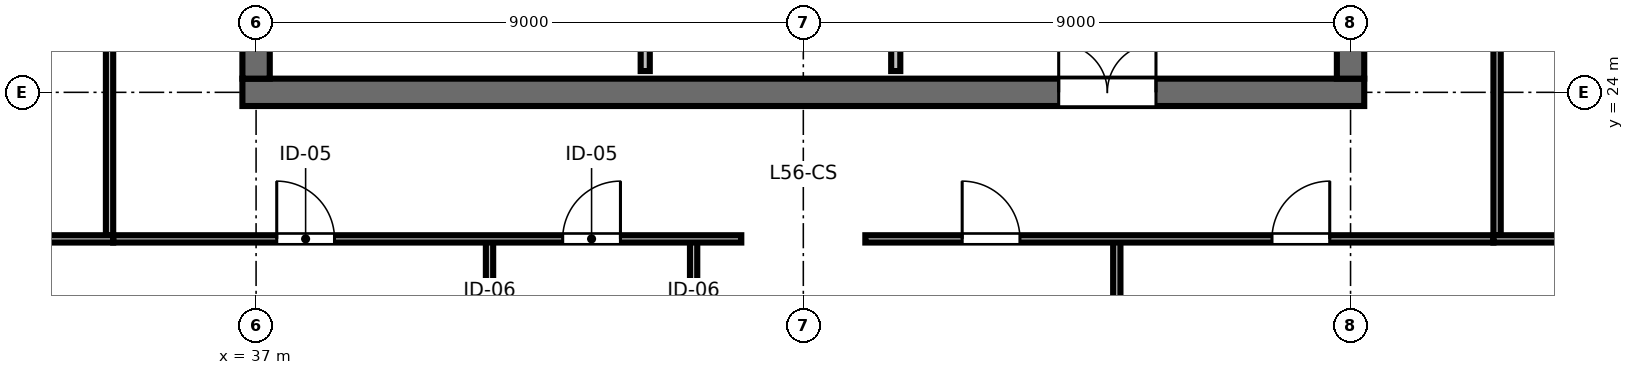
"""IFC4 building model, lengths in metres.
Left out: names, types, materials, properties, quantities, classifications, styles, units other than length and angle.
Written with IfcOpenShell. Run it as: python <this file> out.ifc"""

import sys

from ifc_helpers import new_model, si_unit, direction, frame, frame_2d, origin, place, context, subcontext, project, spatial, rectangle, extrude, element, fill, save


model = new_model("IFC4")
c1 = context("Model", 3, precision=1e-05, world=origin(), true_north=direction((0.0, 1.0)))
c2 = subcontext(c1, "Body", "Model", "MODEL_VIEW")
j1 = project(units=[si_unit("LENGTHUNIT", "METRE"), si_unit("PLANEANGLEUNIT", "RADIAN")], contexts=[c1])
p1 = place(None, origin())
s1 = spatial("IfcSite", under=j1, at=p1, CompositionType="ELEMENT")
p2 = place(p1, origin())
s2 = spatial("IfcBuilding", under=s1, at=p2, CompositionType="ELEMENT")
p3 = place(p2, frame((0.0, 0.0, 213.0)))
s3 = spatial("IfcBuildingStorey", under=s2, at=p3, CompositionType="ELEMENT", Elevation=213.0)
p4 = place(p3, frame((36.775, 24.0, 0.0), z_axis=(0.0, 0.0, 1.0), x_axis=(1.0, 0.0, 0.0)))
e1 = element("IfcWall", 1, at=p4, inside=s3, PredefinedType="SHEAR", context=c2, shape_type="SweptSolid", body=[
    extrude(rectangle(XDim=18.45, YDim=0.45, at=frame_2d((9.225, 0.0))), origin(), (0.0, 0.0, 1.0), 3.36),
])
p5 = place(p4, frame((13.425, 0.0, 0.0)))
e2 = element("IfcOpeningElement", 2, at=p5, cuts=e1, PredefinedType="OPENING", context=c2, shape_type="SweptSolid", body=[
    extrude(rectangle(XDim=1.6, YDim=2.15, at=frame_2d((0.8, 1.075))), frame((0.0, 0.235, 0.0), z_axis=(0.0, -1.0, 0.0), x_axis=(1.0, 0.0, 0.0)), (0.0, 0.0, 1.0), 0.47),
])
p6 = place(p3, frame((37.0, 24.225, 0.0), z_axis=(0.0, 0.0, 1.0), x_axis=(0.0, 1.0, 0.0)))
e3 = element("IfcWall", 3, at=p6, inside=s3, PredefinedType="SHEAR", context=c2, shape_type="SweptSolid", body=[
    extrude(rectangle(XDim=15.55, YDim=0.45, at=frame_2d((7.775, 0.0))), origin(), (0.0, 0.0, 1.0), 3.36),
])
p7 = place(p6, frame((5.3, 0.0, 0.0)))
e4 = element("IfcOpeningElement", 4, at=p7, cuts=e3, PredefinedType="OPENING", context=c2, shape_type="SweptSolid", body=[
    extrude(rectangle(XDim=1.15, YDim=2.15, at=frame_2d((0.575, 1.075))), frame((0.0, 0.235, 0.0), z_axis=(0.0, -1.0, 0.0), x_axis=(1.0, 0.0, 0.0)), (0.0, 0.0, 1.0), 0.47),
])
p8 = place(p3, frame((55.0, 24.225, 0.0), z_axis=(0.0, 0.0, 1.0), x_axis=(0.0, 1.0, 0.0)))
e5 = element("IfcWall", 5, at=p8, inside=s3, PredefinedType="SHEAR", context=c2, shape_type="SweptSolid", body=[
    extrude(rectangle(XDim=15.55, YDim=0.45, at=frame_2d((7.775, 0.0))), origin(), (0.0, 0.0, 1.0), 3.36),
])
p9 = place(p8, frame((5.3, 0.0, 0.0)))
e6 = element("IfcOpeningElement", 6, at=p9, cuts=e5, PredefinedType="OPENING", context=c2, shape_type="SweptSolid", body=[
    extrude(rectangle(XDim=1.15, YDim=2.15, at=frame_2d((0.575, 1.075))), frame((0.0, 0.235, 0.0), z_axis=(0.0, -1.0, 0.0), x_axis=(1.0, 0.0, 0.0)), (0.0, 0.0, 1.0), 0.47),
])
p10 = place(p3, frame((43.4, 24.35, 0.0), z_axis=(0.0, 0.0, 1.0), x_axis=(0.0, 1.0, 0.0)))
e7 = element("IfcWall", 7, at=p10, inside=s3, PredefinedType="PARTITIONING", context=c2, shape_type="SweptSolid", body=[
    extrude(rectangle(XDim=3.9, YDim=0.15, at=frame_2d((1.95, 0.0))), origin(), (0.0, 0.0, 1.0), 3.375),
])
p11 = place(p10, frame((1.5, 0.0, 0.0)))
e8 = element("IfcOpeningElement", 8, at=p11, cuts=e7, PredefinedType="OPENING", context=c2, shape_type="SweptSolid", body=[
    extrude(rectangle(XDim=0.9, YDim=2.15, at=frame_2d((0.45, 1.075))), frame((0.0, 0.085, 0.0), z_axis=(0.0, -1.0, 0.0), x_axis=(1.0, 0.0, 0.0)), (0.0, 0.0, 1.0), 0.17),
])
p12 = place(p3, frame((47.52, 24.35, 0.0), z_axis=(0.0, 0.0, 1.0), x_axis=(0.0, 1.0, 0.0)))
e9 = element("IfcWall", 9, at=p12, inside=s3, PredefinedType="PARTITIONING", context=c2, shape_type="SweptSolid", body=[
    extrude(rectangle(XDim=3.9, YDim=0.15, at=frame_2d((1.95, 0.0))), origin(), (0.0, 0.0, 1.0), 3.375),
])
p13 = place(p12, frame((0.35, 0.0, 0.0)))
e10 = element("IfcOpeningElement", 10, at=p13, cuts=e9, PredefinedType="OPENING", context=c2, shape_type="SweptSolid", body=[
    extrude(rectangle(XDim=0.9, YDim=2.15, at=frame_2d((0.45, 1.075))), frame((0.0, 0.085, 0.0), z_axis=(0.0, -1.0, 0.0), x_axis=(1.0, 0.0, 0.0)), (0.0, 0.0, 1.0), 0.17),
])
p14 = place(p3, frame((40.839, 21.59, 0.0), z_axis=(0.0, 0.0, 1.0), x_axis=(0.0, -1.0, 0.0)))
e11 = element("IfcWall", 11, at=p14, inside=s3, PredefinedType="PARTITIONING", context=c2, shape_type="SweptSolid", body=[
    extrude(rectangle(XDim=7.574, YDim=0.12, at=frame_2d((3.787, 0.0))), origin(), (0.0, 0.0, 1.0), 2.655),
])
p15 = place(p14, frame((1.4, 0.0, 0.0)))
e12 = element("IfcOpeningElement", 12, at=p15, cuts=e11, PredefinedType="OPENING", context=c2, shape_type="SweptSolid", body=[
    extrude(rectangle(XDim=0.9, YDim=2.15, at=frame_2d((0.45, 1.075))), frame((0.0, 0.07, 0.0), z_axis=(0.0, -1.0, 0.0), x_axis=(1.0, 0.0, 0.0)), (0.0, 0.0, 1.0), 0.14),
])
p16 = place(p3, frame((44.196, 21.59, 0.0), z_axis=(0.0, 0.0, 1.0), x_axis=(0.0, -1.0, 0.0)))
e13 = element("IfcWall", 13, at=p16, inside=s3, PredefinedType="PARTITIONING", context=c2, shape_type="SweptSolid", body=[
    extrude(rectangle(XDim=7.574, YDim=0.12, at=frame_2d((3.787, 0.0))), origin(), (0.0, 0.0, 1.0), 2.655),
])
p17 = place(p16, frame((1.4, 0.0, 0.0)))
e14 = element("IfcOpeningElement", 14, at=p17, cuts=e13, PredefinedType="OPENING", context=c2, shape_type="SweptSolid", body=[
    extrude(rectangle(XDim=0.9, YDim=2.15, at=frame_2d((0.45, 1.075))), frame((0.0, 0.07, 0.0), z_axis=(0.0, -1.0, 0.0), x_axis=(1.0, 0.0, 0.0)), (0.0, 0.0, 1.0), 0.14),
])
p18 = place(p3, frame((51.156, 21.59, 0.0), z_axis=(0.0, 0.0, 1.0), x_axis=(0.0, -1.0, 0.0)))
e15 = element("IfcWall", 15, at=p18, inside=s3, PredefinedType="PARTITIONING", context=c2, shape_type="SweptSolid", body=[
    extrude(rectangle(XDim=7.574, YDim=0.12, at=frame_2d((3.787, 0.0))), origin(), (0.0, 0.0, 1.0), 2.655),
])
p19 = place(p18, frame((1.4, 0.0, 0.0)))
e16 = element("IfcOpeningElement", 16, at=p19, cuts=e15, PredefinedType="OPENING", context=c2, shape_type="SweptSolid", body=[
    extrude(rectangle(XDim=0.9, YDim=2.15, at=frame_2d((0.45, 1.075))), frame((0.0, 0.07, 0.0), z_axis=(0.0, -1.0, 0.0), x_axis=(1.0, 0.0, 0.0)), (0.0, 0.0, 1.0), 0.14),
])
p20 = place(p3, frame((34.65, 21.59, 0.0), z_axis=(0.0, 0.0, 1.0), x_axis=(1.0, 0.0, 0.0)))
e17 = element("IfcWall", 17, at=p20, inside=s3, PredefinedType="PARTITIONING", context=c2, shape_type="SweptSolid", body=[
    extrude(rectangle(XDim=10.33, YDim=0.12, at=frame_2d((5.165, 0.0))), origin(), (0.0, 0.0, 1.0), 2.655),
])
p21 = place(p20, frame((2.69, 0.0, 0.0)))
e18 = element("IfcOpeningElement", 18, at=p21, cuts=e17, PredefinedType="OPENING", context=c2, shape_type="SweptSolid", body=[
    extrude(rectangle(XDim=0.95, YDim=2.15, at=frame_2d((0.475, 1.075))), frame((0.0, 0.07, 0.0), z_axis=(0.0, -1.0, 0.0), x_axis=(1.0, 0.0, 0.0)), (0.0, 0.0, 1.0), 0.14),
])
p22 = place(p20, frame((7.393, 0.0, 0.0)))
e19 = element("IfcOpeningElement", 19, at=p22, cuts=e17, PredefinedType="OPENING", context=c2, shape_type="SweptSolid", body=[
    extrude(rectangle(XDim=0.95, YDim=2.15, at=frame_2d((0.475, 1.075))), frame((0.0, 0.07, 0.0), z_axis=(0.0, -1.0, 0.0), x_axis=(1.0, 0.0, 0.0)), (0.0, 0.0, 1.0), 0.14),
])
p23 = place(p3, frame((47.02, 21.59, 0.0), z_axis=(0.0, 0.0, 1.0), x_axis=(1.0, 0.0, 0.0)))
e20 = element("IfcWall", 20, at=p23, inside=s3, PredefinedType="PARTITIONING", context=c2, shape_type="SweptSolid", body=[
    extrude(rectangle(XDim=10.33, YDim=0.12, at=frame_2d((5.165, 0.0))), origin(), (0.0, 0.0, 1.0), 2.655),
])
p24 = place(p23, frame((1.593, 0.0, 0.0)))
e21 = element("IfcOpeningElement", 21, at=p24, cuts=e20, PredefinedType="OPENING", context=c2, shape_type="SweptSolid", body=[
    extrude(rectangle(XDim=0.95, YDim=2.15, at=frame_2d((0.475, 1.075))), frame((0.0, 0.07, 0.0), z_axis=(0.0, -1.0, 0.0), x_axis=(1.0, 0.0, 0.0)), (0.0, 0.0, 1.0), 0.14),
])
p25 = place(p23, frame((6.688, 0.0, 0.0)))
e22 = element("IfcOpeningElement", 22, at=p25, cuts=e20, PredefinedType="OPENING", context=c2, shape_type="SweptSolid", body=[
    extrude(rectangle(XDim=0.95, YDim=2.15, at=frame_2d((0.475, 1.075))), frame((0.0, 0.07, 0.0), z_axis=(0.0, -1.0, 0.0), x_axis=(1.0, 0.0, 0.0)), (0.0, 0.0, 1.0), 0.14),
])
p26 = place(p3, frame((34.59, 21.65, 0.0), z_axis=(0.0, 0.0, 1.0), x_axis=(0.0, 1.0, 0.0)))
e23 = element("IfcWall", 23, at=p26, inside=s3, PredefinedType="PARTITIONING", context=c2, shape_type="SweptSolid", body=[
    extrude(rectangle(XDim=20.7, YDim=0.12, at=frame_2d((10.35, 0.0))), origin(), (0.0, 0.0, 1.0), 2.655),
])
p27 = place(p26, frame((9.875, 0.0, 0.0)))
e24 = element("IfcOpeningElement", 24, at=p27, cuts=e23, PredefinedType="OPENING", context=c2, shape_type="SweptSolid", body=[
    extrude(rectangle(XDim=0.95, YDim=2.15, at=frame_2d((0.475, 1.075))), frame((0.0, 0.07, 0.0), z_axis=(0.0, -1.0, 0.0), x_axis=(1.0, 0.0, 0.0)), (0.0, 0.0, 1.0), 0.14),
])
p28 = place(p3, frame((57.41, 21.65, 0.0), z_axis=(0.0, 0.0, 1.0), x_axis=(0.0, 1.0, 0.0)))
e25 = element("IfcWall", 25, at=p28, inside=s3, PredefinedType="PARTITIONING", context=c2, shape_type="SweptSolid", body=[
    extrude(rectangle(XDim=20.7, YDim=0.12, at=frame_2d((10.35, 0.0))), origin(), (0.0, 0.0, 1.0), 2.655),
])
p29 = place(p28, frame((3.546, 0.0, 0.0)))
e26 = element("IfcOpeningElement", 26, at=p29, cuts=e25, PredefinedType="OPENING", context=c2, shape_type="SweptSolid", body=[
    extrude(rectangle(XDim=0.95, YDim=2.15, at=frame_2d((0.475, 1.075))), frame((0.0, 0.07, 0.0), z_axis=(0.0, -1.0, 0.0), x_axis=(1.0, 0.0, 0.0)), (0.0, 0.0, 1.0), 0.14),
])
p30 = place(p28, frame((10.054, 0.0, 0.0)))
e27 = element("IfcOpeningElement", 27, at=p30, cuts=e25, PredefinedType="OPENING", context=c2, shape_type="SweptSolid", body=[
    extrude(rectangle(XDim=0.95, YDim=2.15, at=frame_2d((0.475, 1.075))), frame((0.0, 0.07, 0.0), z_axis=(0.0, -1.0, 0.0), x_axis=(1.0, 0.0, 0.0)), (0.0, 0.0, 1.0), 0.14),
])
p31 = place(p28, frame((16.384, 0.0, 0.0)))
e28 = element("IfcOpeningElement", 28, at=p31, cuts=e25, PredefinedType="OPENING", context=c2, shape_type="SweptSolid", body=[
    extrude(rectangle(XDim=0.95, YDim=2.15, at=frame_2d((0.475, 1.075))), frame((0.0, 0.07, 0.0), z_axis=(0.0, -1.0, 0.0), x_axis=(1.0, 0.0, 0.0)), (0.0, 0.0, 1.0), 0.14),
])
for number, where, z_axis, x_axis in (
    (29, (34.65, 21.59, 0.0), (0.0, 0.0, 1.0), (-1.0, 0.0, 0.0)),
    (30, (57.35, 21.59, 0.0), (0.0, 0.0, 1.0), (1.0, 0.0, 0.0)),
):
    element("IfcWall", number, at=place(p3, frame(where, z_axis=z_axis, x_axis=x_axis)), inside=s3, PredefinedType="PARTITIONING", context=c2, shape_type="SweptSolid", body=[
        extrude(rectangle(XDim=8.856, YDim=0.12, at=frame_2d((4.428, 0.0))), origin(), (0.0, 0.0, 1.0), 2.655),
    ])
p32 = place(p5, origin())
e31 = element("IfcDoor", 31, at=p32, inside=s3, OperationType="DOUBLE_DOOR_SINGLE_SWING", PredefinedType="DOOR", context=c2, shape_type="SweptSolid", body=[
    extrude(rectangle(XDim=1.6, YDim=2.15, at=frame_2d((0.8, 1.075))), frame((0.0, 0.025, 0.0), z_axis=(0.0, -1.0, 0.0), x_axis=(1.0, 0.0, 0.0)), (0.0, 0.0, 1.0), 0.05),
])
fill(e2, e31)
p33 = place(p21, origin())
e32 = element("IfcDoor", 32, at=p33, inside=s3, OperationType="SINGLE_SWING_LEFT", PredefinedType="DOOR", context=c2, shape_type="SweptSolid", body=[
    extrude(rectangle(XDim=0.95, YDim=2.15, at=frame_2d((0.475, 1.075))), frame((0.0, 0.025, 0.0), z_axis=(0.0, -1.0, 0.0), x_axis=(1.0, 0.0, 0.0)), (0.0, 0.0, 1.0), 0.05),
])
fill(e18, e32)
p34 = place(p22, origin())
e33 = element("IfcDoor", 33, at=p34, inside=s3, OperationType="SINGLE_SWING_RIGHT", PredefinedType="DOOR", context=c2, shape_type="SweptSolid", body=[
    extrude(rectangle(XDim=0.95, YDim=2.15, at=frame_2d((0.475, 1.075))), frame((0.0, 0.025, 0.0), z_axis=(0.0, -1.0, 0.0), x_axis=(1.0, 0.0, 0.0)), (0.0, 0.0, 1.0), 0.05),
])
fill(e19, e33)
p35 = place(p24, origin())
e34 = element("IfcDoor", 34, at=p35, inside=s3, OperationType="SINGLE_SWING_LEFT", PredefinedType="DOOR", context=c2, shape_type="SweptSolid", body=[
    extrude(rectangle(XDim=0.95, YDim=2.15, at=frame_2d((0.475, 1.075))), frame((0.0, 0.025, 0.0), z_axis=(0.0, -1.0, 0.0), x_axis=(1.0, 0.0, 0.0)), (0.0, 0.0, 1.0), 0.05),
])
fill(e21, e34)
p36 = place(p25, origin())
e35 = element("IfcDoor", 35, at=p36, inside=s3, OperationType="SINGLE_SWING_RIGHT", PredefinedType="DOOR", context=c2, shape_type="SweptSolid", body=[
    extrude(rectangle(XDim=0.95, YDim=2.15, at=frame_2d((0.475, 1.075))), frame((0.0, 0.025, 0.0), z_axis=(0.0, -1.0, 0.0), x_axis=(1.0, 0.0, 0.0)), (0.0, 0.0, 1.0), 0.05),
])
fill(e22, e35)
save(model, sys.argv[1])
